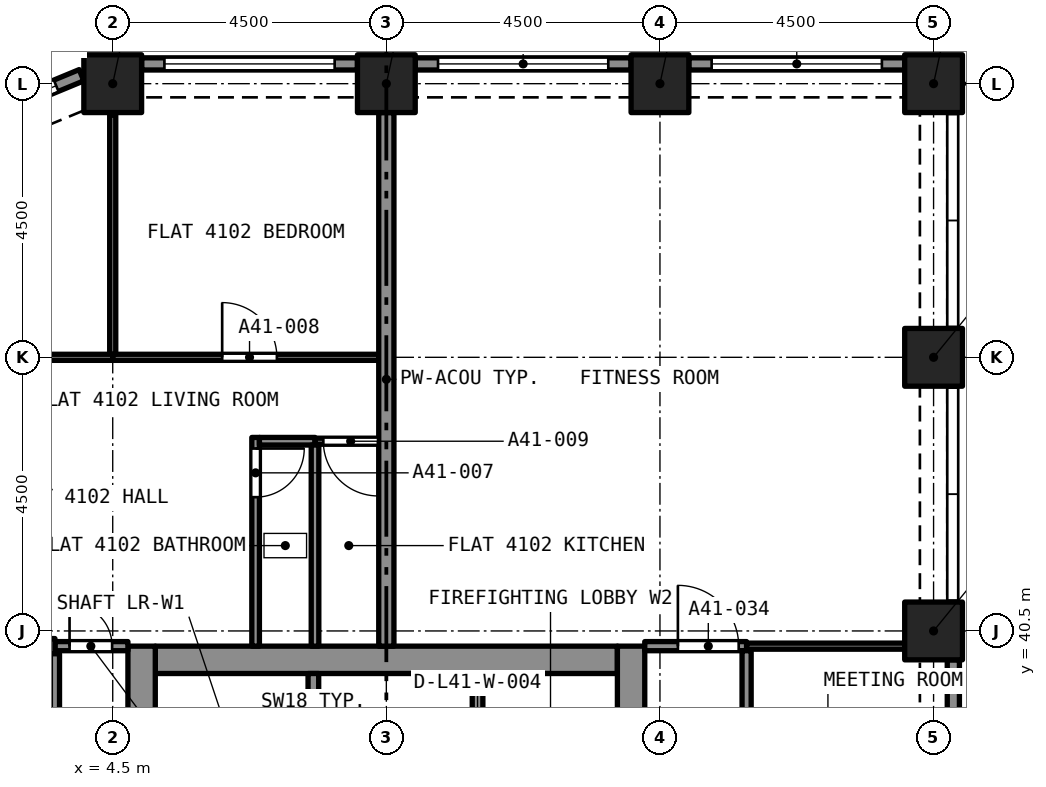
"""IFC4 building model, lengths in metres.
Left out: names, types, materials, properties, quantities, classifications, styles, units other than length and angle.
Written with IfcOpenShell. Run it as: python <this file> out.ifc"""

import sys

from ifc_helpers import new_model, si_unit, direction, frame, frame_2d, origin, origin_2d, place, context, subcontext, project, spatial, rectangle, extrude, element, fill, save


model = new_model("IFC4")
c1 = context("Model", 3, precision=1e-05, world=origin(), true_north=direction((0.0, 1.0)))
c2 = subcontext(c1, "Body", "Model", "MODEL_VIEW")
j1 = project(units=[si_unit("LENGTHUNIT", "METRE"), si_unit("PLANEANGLEUNIT", "RADIAN")], contexts=[c1])
p1 = place(None, origin())
s1 = spatial("IfcSite", under=j1, at=p1, CompositionType="ELEMENT")
p2 = place(p1, origin())
s2 = spatial("IfcBuilding", under=s1, at=p2, CompositionType="ELEMENT")
p3 = place(p2, frame((0.0, 0.0, 146.2)))
s3 = spatial("IfcBuildingStorey", under=s2, at=p3, CompositionType="ELEMENT", Elevation=146.2)
for number, where, z_axis, x_axis in (
    (1, (18.0, 40.5, 0.0), (0.0, 0.0, 1.0), (1.0, 0.0, 0.0)),
    (2, (18.0, 45.0, 0.0), (0.0, 0.0, 1.0), (1.0, 0.0, 0.0)),
    (3, (4.5, 49.5, 0.0), (0.0, 0.0, 1.0), (1.0, 0.0, 0.0)),
    (4, (9.0, 49.5, 0.0), (0.0, 0.0, 1.0), (1.0, 0.0, 0.0)),
    (5, (13.5, 49.5, 0.0), (0.0, 0.0, 1.0), (1.0, 0.0, 0.0)),
    (6, (18.0, 49.5, 0.0), (0.0, 0.0, 1.0), (1.0, 0.0, 0.0)),
):
    element("IfcColumn", number, at=place(p3, frame(where, z_axis=z_axis, x_axis=x_axis)), inside=s3, PredefinedType="COLUMN", context=c2, shape_type="SweptSolid", body=[
        extrude(rectangle(XDim=0.95, YDim=0.95, at=origin_2d()), origin(), (0.0, 0.0, 1.0), 4.4),
    ])
p4 = place(p3, frame((5.2, 40.025, 0.0), z_axis=(0.0, 0.0, 1.0), x_axis=(1.0, 0.0, 0.0)))
e7 = element("IfcWall", 7, at=p4, inside=s3, PredefinedType="SOLIDWALL", context=c2, shape_type="SweptSolid", body=[
    extrude(rectangle(XDim=7.6, YDim=0.45, at=frame_2d((3.8, 0.0))), origin(), (0.0, 0.0, 1.0), 4.4),
])
p5 = place(p3, frame((4.975, 27.25, 0.0), z_axis=(0.0, 0.0, 1.0), x_axis=(0.0, 1.0, 0.0)))
e8 = element("IfcWall", 8, at=p5, inside=s3, PredefinedType="SOLIDWALL", context=c2, shape_type="SweptSolid", body=[
    extrude(rectangle(XDim=13.0, YDim=0.45, at=frame_2d((6.5, 0.0))), origin(), (0.0, 0.0, 1.0), 4.4),
])
p6 = place(p5, frame((8.7, 0.0, 0.0)))
e9 = element("IfcOpeningElement", 9, at=p6, cuts=e8, PredefinedType="OPENING", context=c2, shape_type="SweptSolid", body=[
    extrude(rectangle(XDim=1.2, YDim=2.1, at=frame_2d((0.6, 1.05))), frame((0.0, 0.235, 0.0), z_axis=(0.0, -1.0, 0.0), x_axis=(1.0, 0.0, 0.0)), (0.0, 0.0, 1.0), 0.47),
])
p7 = place(p3, frame((13.025, 27.25, 0.0), z_axis=(0.0, 0.0, 1.0), x_axis=(0.0, 1.0, 0.0)))
e10 = element("IfcWall", 10, at=p7, inside=s3, PredefinedType="SOLIDWALL", context=c2, shape_type="SweptSolid", body=[
    extrude(rectangle(XDim=13.0, YDim=0.45, at=frame_2d((6.5, 0.0))), origin(), (0.0, 0.0, 1.0), 4.4),
])
p8 = place(p7, frame((10.85, 0.0, 0.0)))
e11 = element("IfcOpeningElement", 11, at=p8, cuts=e10, PredefinedType="OPENING", context=c2, shape_type="SweptSolid", body=[
    extrude(rectangle(XDim=1.1, YDim=2.1, at=frame_2d((0.55, 1.05))), frame((0.0, 0.235, 0.0), z_axis=(0.0, -1.0, 0.0), x_axis=(1.0, 0.0, 0.0)), (0.0, 0.0, 1.0), 0.47),
])
p9 = place(p7, frame((8.7, 0.0, 0.0)))
e12 = element("IfcOpeningElement", 12, at=p9, cuts=e10, PredefinedType="OPENING", context=c2, shape_type="SweptSolid", body=[
    extrude(rectangle(XDim=1.2, YDim=2.1, at=frame_2d((0.6, 1.05))), frame((0.0, 0.235, 0.0), z_axis=(0.0, -1.0, 0.0), x_axis=(1.0, 0.0, 0.0)), (0.0, 0.0, 1.0), 0.47),
])
p10 = place(p3, frame((13.975, 49.825, 0.0), z_axis=(0.0, 0.0, 1.0), x_axis=(1.0, 0.0, 0.0)))
e13 = element("IfcWall", 13, at=p10, inside=s3, PredefinedType="SOLIDWALL", context=c2, shape_type="SweptSolid", body=[
    extrude(rectangle(XDim=3.55, YDim=0.2, at=frame_2d((1.775, 0.0))), origin(), (0.0, 0.0, 1.0), 4.4),
])
p11 = place(p10, frame((0.375, 0.0, 0.45)))
e14 = element("IfcOpeningElement", 14, at=p11, cuts=e13, PredefinedType="OPENING", context=c2, shape_type="SweptSolid", body=[
    extrude(rectangle(XDim=2.8, YDim=2.55, at=frame_2d((1.4, 1.275))), frame((0.0, 0.11, 0.0), z_axis=(0.0, -1.0, 0.0), x_axis=(1.0, 0.0, 0.0)), (0.0, 0.0, 1.0), 0.22),
])
p12 = place(p3, frame((9.475, 49.825, 0.0), z_axis=(0.0, 0.0, 1.0), x_axis=(1.0, 0.0, 0.0)))
e15 = element("IfcWall", 15, at=p12, inside=s3, PredefinedType="SOLIDWALL", context=c2, shape_type="SweptSolid", body=[
    extrude(rectangle(XDim=3.55, YDim=0.2, at=frame_2d((1.775, 0.0))), origin(), (0.0, 0.0, 1.0), 4.4),
])
p13 = place(p12, frame((0.375, 0.0, 0.45)))
e16 = element("IfcOpeningElement", 16, at=p13, cuts=e15, PredefinedType="OPENING", context=c2, shape_type="SweptSolid", body=[
    extrude(rectangle(XDim=2.8, YDim=2.55, at=frame_2d((1.4, 1.275))), frame((0.0, 0.11, 0.0), z_axis=(0.0, -1.0, 0.0), x_axis=(1.0, 0.0, 0.0)), (0.0, 0.0, 1.0), 0.22),
])
p14 = place(p3, frame((4.975, 49.825, 0.0), z_axis=(0.0, 0.0, 1.0), x_axis=(1.0, 0.0, 0.0)))
e17 = element("IfcWall", 17, at=p14, inside=s3, PredefinedType="SOLIDWALL", context=c2, shape_type="SweptSolid", body=[
    extrude(rectangle(XDim=3.55, YDim=0.2, at=frame_2d((1.775, 0.0))), origin(), (0.0, 0.0, 1.0), 4.4),
])
p15 = place(p14, frame((0.375, 0.0, 0.45)))
e18 = element("IfcOpeningElement", 18, at=p15, cuts=e17, PredefinedType="OPENING", context=c2, shape_type="SweptSolid", body=[
    extrude(rectangle(XDim=2.8, YDim=2.55, at=frame_2d((1.4, 1.275))), frame((0.0, 0.11, 0.0), z_axis=(0.0, -1.0, 0.0), x_axis=(1.0, 0.0, 0.0)), (0.0, 0.0, 1.0), 0.22),
])
p16 = place(p3, frame((1.767, 48.72, 0.0), z_axis=(0.0, 0.0, 1.0), x_axis=(0.923880599843, 0.382680855588, 0.0)))
e19 = element("IfcWall", 19, at=p16, inside=s3, PredefinedType="SOLIDWALL", context=c2, shape_type="SweptSolid", body=[
    extrude(rectangle(XDim=2.403, YDim=0.2, at=frame_2d((1.201, 0.0))), origin(), (0.0, 0.0, 1.0), 4.4),
])
p17 = place(p16, frame((0.251, 0.0, 0.45)))
e20 = element("IfcOpeningElement", 20, at=p17, cuts=e19, PredefinedType="OPENING", context=c2, shape_type="SweptSolid", body=[
    extrude(rectangle(XDim=1.7, YDim=2.55, at=frame_2d((0.85, 1.275))), frame((0.0, 0.11, 0.0), z_axis=(0.0, -1.0, 0.0), x_axis=(1.0, 0.0, 0.0)), (0.0, 0.0, 1.0), 0.22),
])
p18 = place(p3, frame((18.325, 40.025, 0.0), z_axis=(0.0, 0.0, 1.0), x_axis=(0.0, -1.0, 0.0)))
e21 = element("IfcWall", 21, at=p18, inside=s3, PredefinedType="SOLIDWALL", context=c2, shape_type="SweptSolid", body=[
    extrude(rectangle(XDim=3.55, YDim=0.2, at=frame_2d((1.775, 0.0))), origin(), (0.0, 0.0, 1.0), 4.4),
])
p19 = place(p18, frame((0.875, 0.0, 0.0)))
e22 = element("IfcOpeningElement", 22, at=p19, cuts=e21, PredefinedType="OPENING", context=c2, shape_type="SweptSolid", body=[
    extrude(rectangle(XDim=1.8, YDim=2.4, at=frame_2d((0.9, 1.2))), frame((0.0, 0.11, 0.0), z_axis=(0.0, -1.0, 0.0), x_axis=(1.0, 0.0, 0.0)), (0.0, 0.0, 1.0), 0.22),
])
p20 = place(p3, frame((6.85, 43.683, 0.0), z_axis=(0.0, 0.0, 1.0), x_axis=(0.0, -1.0, 0.0)))
e23 = element("IfcWall", 23, at=p20, inside=s3, PredefinedType="PARTITIONING", context=c2, shape_type="SweptSolid", body=[
    extrude(rectangle(XDim=3.433, YDim=0.125, at=frame_2d((1.716, 0.0))), origin(), (0.0, 0.0, 1.0), 4.1),
])
p21 = place(p20, frame((0.183, 0.0, 0.0)))
e24 = element("IfcOpeningElement", 24, at=p21, cuts=e23, PredefinedType="OPENING", context=c2, shape_type="SweptSolid", body=[
    extrude(rectangle(XDim=0.8, YDim=2.1, at=frame_2d((0.4, 1.05))), frame((0.0, 0.073, 0.0), z_axis=(0.0, -1.0, 0.0), x_axis=(1.0, 0.0, 0.0)), (0.0, 0.0, 1.0), 0.145),
])
p22 = place(p3, frame((6.913, 43.62, 0.0), z_axis=(0.0, 0.0, 1.0), x_axis=(1.0, 0.0, 0.0)))
e25 = element("IfcWall", 25, at=p22, inside=s3, PredefinedType="PARTITIONING", context=c2, shape_type="SweptSolid", body=[
    extrude(rectangle(XDim=0.915, YDim=0.125, at=frame_2d((0.458, 0.0))), origin(), (0.0, 0.0, 1.0), 4.1),
])
p23 = place(p3, frame((7.827, 40.25, 0.0), z_axis=(0.0, 0.0, 1.0), x_axis=(0.0, 1.0, 0.0)))
e26 = element("IfcWall", 26, at=p23, inside=s3, PredefinedType="PARTITIONING", context=c2, shape_type="SweptSolid", body=[
    extrude(rectangle(XDim=3.308, YDim=0.125, at=frame_2d((1.654, 0.0))), origin(), (0.0, 0.0, 1.0), 4.1),
])
p24 = place(p3, frame((4.5, 45.0, 0.0), z_axis=(0.0, 0.0, 1.0), x_axis=(1.0, 0.0, 0.0)))
e27 = element("IfcWall", 27, at=p24, inside=s3, PredefinedType="PARTITIONING", context=c2, shape_type="SweptSolid", body=[
    extrude(rectangle(XDim=4.375, YDim=0.1, at=frame_2d((2.188, 0.0))), origin(), (0.0, 0.0, 1.0), 4.1),
])
p25 = place(p24, frame((1.8, 0.0, 0.0)))
e28 = element("IfcOpeningElement", 28, at=p25, cuts=e27, PredefinedType="OPENING", context=c2, shape_type="SweptSolid", body=[
    extrude(rectangle(XDim=0.9, YDim=2.1, at=frame_2d((0.45, 1.05))), frame((0.0, 0.06, 0.0), z_axis=(0.0, -1.0, 0.0), x_axis=(1.0, 0.0, 0.0)), (0.0, 0.0, 1.0), 0.12),
])
p26 = place(p3, frame((4.5, 45.05, 0.0), z_axis=(0.0, 0.0, 1.0), x_axis=(0.0, 1.0, 0.0)))
e29 = element("IfcWall", 29, at=p26, inside=s3, PredefinedType="PARTITIONING", context=c2, shape_type="SweptSolid", body=[
    extrude(rectangle(XDim=3.936, YDim=0.1, at=frame_2d((1.968, 0.0))), origin(), (0.0, 0.0, 1.0), 4.1),
])
p27 = place(p3, frame((8.875, 43.62, 0.0), z_axis=(0.0, 0.0, 1.0), x_axis=(-1.0, 0.0, 0.0)))
e30 = element("IfcWall", 30, at=p27, inside=s3, PredefinedType="PARTITIONING", context=c2, shape_type="SweptSolid", body=[
    extrude(rectangle(XDim=1.048, YDim=0.1, at=frame_2d((0.524, 0.0))), origin(), (0.0, 0.0, 1.0), 4.1),
])
p28 = place(p27, frame((0.011, 0.0, 0.0)))
e31 = element("IfcOpeningElement", 31, at=p28, cuts=e30, PredefinedType="OPENING", context=c2, shape_type="SweptSolid", body=[
    extrude(rectangle(XDim=0.9, YDim=2.1, at=frame_2d((0.45, 1.05))), frame((0.0, 0.06, 0.0), z_axis=(0.0, -1.0, 0.0), x_axis=(1.0, 0.0, 0.0)), (0.0, 0.0, 1.0), 0.12),
])
p29 = place(p3, frame((0.514, 45.0, 0.0), z_axis=(0.0, 0.0, 1.0), x_axis=(1.0, 0.0, 0.0)))
e32 = element("IfcWall", 32, at=p29, inside=s3, PredefinedType="PARTITIONING", context=c2, shape_type="SweptSolid", body=[
    extrude(rectangle(XDim=3.986, YDim=0.1, at=frame_2d((1.993, 0.0))), origin(), (0.0, 0.0, 1.0), 4.1),
])
p30 = place(p29, frame((1.473, 0.0, 0.0)))
e33 = element("IfcOpeningElement", 33, at=p30, cuts=e32, PredefinedType="OPENING", context=c2, shape_type="SweptSolid", body=[
    extrude(rectangle(XDim=1.0, YDim=2.1, at=frame_2d((0.5, 1.05))), frame((0.0, 0.06, 0.0), z_axis=(0.0, -1.0, 0.0), x_axis=(1.0, 0.0, 0.0)), (0.0, 0.0, 1.0), 0.12),
])
p31 = place(p3, frame((3.55, 40.25, 0.0), z_axis=(0.0, 0.0, 1.0), x_axis=(1.0, 0.0, 0.0)))
e34 = element("IfcWall", 34, at=p31, inside=s3, PredefinedType="PARTITIONING", context=c2, shape_type="SweptSolid", body=[
    extrude(rectangle(XDim=1.2, YDim=0.15, at=frame_2d((0.6, 0.0))), origin(), (0.0, 0.0, 1.0), 4.1),
])
p32 = place(p31, frame((0.24, 0.0, 0.0)))
e35 = element("IfcOpeningElement", 35, at=p32, cuts=e34, PredefinedType="OPENING", context=c2, shape_type="SweptSolid", body=[
    extrude(rectangle(XDim=0.7, YDim=2.1, at=frame_2d((0.35, 1.05))), frame((0.0, 0.085, 0.0), z_axis=(0.0, -1.0, 0.0), x_axis=(1.0, 0.0, 0.0)), (0.0, 0.0, 1.0), 0.17),
])
p33 = place(p3, frame((0.475, 40.25, 0.0), z_axis=(0.0, 0.0, 1.0), x_axis=(1.0, 0.0, 0.0)))
e36 = element("IfcWall", 36, at=p33, inside=s3, PredefinedType="PARTITIONING", context=c2, shape_type="SweptSolid", body=[
    extrude(rectangle(XDim=3.075, YDim=0.25, at=frame_2d((1.538, 0.0))), origin(), (0.0, 0.0, 1.0), 4.1),
])
p34 = place(p3, frame((9.0, 40.25, 0.0), z_axis=(0.0, 0.0, 1.0), x_axis=(0.0, 1.0, 0.0)))
e37 = element("IfcWall", 37, at=p34, inside=s3, PredefinedType="PARTITIONING", context=c2, shape_type="SweptSolid", body=[
    extrude(rectangle(XDim=8.775, YDim=0.25, at=frame_2d((4.387, 0.0))), origin(), (0.0, 0.0, 1.0), 4.1),
])
p35 = place(p3, frame((13.25, 40.25, 0.0), z_axis=(0.0, 0.0, 1.0), x_axis=(1.0, 0.0, 0.0)))
e38 = element("IfcWall", 38, at=p35, inside=s3, PredefinedType="PARTITIONING", context=c2, shape_type="SweptSolid", body=[
    extrude(rectangle(XDim=1.675, YDim=0.15, at=frame_2d((0.837, 0.0))), origin(), (0.0, 0.0, 1.0), 4.1),
])
p36 = place(p35, frame((0.545, 0.0, 0.0)))
e39 = element("IfcOpeningElement", 39, at=p36, cuts=e38, PredefinedType="OPENING", context=c2, shape_type="SweptSolid", body=[
    extrude(rectangle(XDim=1.0, YDim=2.1, at=frame_2d((0.5, 1.05))), frame((0.0, 0.085, 0.0), z_axis=(0.0, -1.0, 0.0), x_axis=(1.0, 0.0, 0.0)), (0.0, 0.0, 1.0), 0.17),
])
p37 = place(p3, frame((14.925, 40.25, 0.0), z_axis=(0.0, 0.0, 1.0), x_axis=(1.0, 0.0, 0.0)))
e40 = element("IfcWall", 40, at=p37, inside=s3, PredefinedType="PARTITIONING", context=c2, shape_type="SweptSolid", body=[
    extrude(rectangle(XDim=2.6, YDim=0.1, at=frame_2d((1.3, 0.0))), origin(), (0.0, 0.0, 1.0), 4.1),
])
p38 = place(p3, frame((14.925, 40.175, 0.0), z_axis=(0.0, 0.0, 1.0), x_axis=(0.0, -1.0, 0.0)))
e41 = element("IfcWall", 41, at=p38, inside=s3, PredefinedType="PARTITIONING", context=c2, shape_type="SweptSolid", body=[
    extrude(rectangle(XDim=8.675, YDim=0.15, at=frame_2d((4.337, 0.0))), origin(), (0.0, 0.0, 1.0), 4.1),
])
p39 = place(p38, frame((3.8, 0.0, 0.0)))
e42 = element("IfcOpeningElement", 42, at=p39, cuts=e41, PredefinedType="OPENING", context=c2, shape_type="SweptSolid", body=[
    extrude(rectangle(XDim=1.0, YDim=2.1, at=frame_2d((0.5, 1.05))), frame((0.0, 0.085, 0.0), z_axis=(0.0, -1.0, 0.0), x_axis=(1.0, 0.0, 0.0)), (0.0, 0.0, 1.0), 0.17),
])
p40 = place(p3, frame((3.55, 31.5, 0.0), z_axis=(0.0, 0.0, 1.0), x_axis=(0.0, 1.0, 0.0)))
e43 = element("IfcWall", 43, at=p40, inside=s3, PredefinedType="PARTITIONING", context=c2, shape_type="SweptSolid", body=[
    extrude(rectangle(XDim=8.625, YDim=0.15, at=frame_2d((4.312, 0.0))), origin(), (0.0, 0.0, 1.0), 4.1),
])
p41 = place(p40, frame((3.875, 0.0, 0.0)))
e44 = element("IfcOpeningElement", 44, at=p41, cuts=e43, PredefinedType="OPENING", context=c2, shape_type="SweptSolid", body=[
    extrude(rectangle(XDim=1.0, YDim=2.1, at=frame_2d((0.5, 1.05))), frame((0.0, 0.085, 0.0), z_axis=(0.0, -1.0, 0.0), x_axis=(1.0, 0.0, 0.0)), (0.0, 0.0, 1.0), 0.17),
])
p42 = place(p3, frame((7.8, 37.5, 0.0), z_axis=(0.0, 0.0, 1.0), x_axis=(0.0, 1.0, 0.0)))
e45 = element("IfcWall", 45, at=p42, inside=s3, PredefinedType="SOLIDWALL", context=c2, shape_type="SweptSolid", body=[
    extrude(rectangle(XDim=2.3, YDim=0.175, at=frame_2d((1.15, 0.0))), origin(), (0.0, 0.0, 1.0), 4.1),
])
p43 = place(p3, frame((10.5, 37.5, 0.0), z_axis=(0.0, 0.0, 1.0), x_axis=(0.0, 1.0, 0.0)))
e46 = element("IfcWall", 46, at=p43, inside=s3, PredefinedType="SOLIDWALL", context=c2, shape_type="SweptSolid", body=[
    extrude(rectangle(XDim=2.3, YDim=0.175, at=frame_2d((1.15, 0.0))), origin(), (0.0, 0.0, 1.0), 4.1),
])
p44 = place(p43, frame((0.65, 0.0, 0.0)))
e47 = element("IfcOpeningElement", 47, at=p44, cuts=e46, PredefinedType="OPENING", context=c2, shape_type="SweptSolid", body=[
    extrude(rectangle(XDim=1.0, YDim=2.1, at=frame_2d((0.5, 1.05))), frame((0.0, 0.097, 0.0), z_axis=(0.0, -1.0, 0.0), x_axis=(1.0, 0.0, 0.0)), (0.0, 0.0, 1.0), 0.195),
])
p45 = place(p11, origin())
e48 = element("IfcWindow", 48, at=p45, inside=s3, PartitioningType="SINGLE_PANEL", PredefinedType="WINDOW", context=c2, shape_type="SweptSolid", body=[
    extrude(rectangle(XDim=2.8, YDim=2.55, at=frame_2d((1.4, 1.275))), frame((0.0, 0.03, 0.0), z_axis=(0.0, -1.0, 0.0), x_axis=(1.0, 0.0, 0.0)), (0.0, 0.0, 1.0), 0.06),
])
fill(e14, e48)
p46 = place(p13, origin())
e49 = element("IfcWindow", 49, at=p46, inside=s3, PartitioningType="SINGLE_PANEL", PredefinedType="WINDOW", context=c2, shape_type="SweptSolid", body=[
    extrude(rectangle(XDim=2.8, YDim=2.55, at=frame_2d((1.4, 1.275))), frame((0.0, 0.03, 0.0), z_axis=(0.0, -1.0, 0.0), x_axis=(1.0, 0.0, 0.0)), (0.0, 0.0, 1.0), 0.06),
])
fill(e16, e49)
p47 = place(p15, origin())
e50 = element("IfcWindow", 50, at=p47, inside=s3, PartitioningType="SINGLE_PANEL", PredefinedType="WINDOW", context=c2, shape_type="SweptSolid", body=[
    extrude(rectangle(XDim=2.8, YDim=2.55, at=frame_2d((1.4, 1.275))), frame((0.0, 0.03, 0.0), z_axis=(0.0, -1.0, 0.0), x_axis=(1.0, 0.0, 0.0)), (0.0, 0.0, 1.0), 0.06),
])
fill(e18, e50)
p48 = place(p17, origin())
e51 = element("IfcWindow", 51, at=p48, inside=s3, PartitioningType="SINGLE_PANEL", PredefinedType="WINDOW", context=c2, shape_type="SweptSolid", body=[
    extrude(rectangle(XDim=1.7, YDim=2.55, at=frame_2d((0.85, 1.275))), frame((0.0, 0.03, 0.0), z_axis=(0.0, -1.0, 0.0), x_axis=(1.0, 0.0, 0.0)), (0.0, 0.0, 1.0), 0.06),
])
fill(e20, e51)
p49 = place(p21, origin())
e52 = element("IfcDoor", 52, at=p49, inside=s3, OperationType="SINGLE_SWING_LEFT", PredefinedType="DOOR", context=c2, shape_type="SweptSolid", body=[
    extrude(rectangle(XDim=0.8, YDim=2.1, at=frame_2d((0.4, 1.05))), frame((0.0, 0.025, 0.0), z_axis=(0.0, -1.0, 0.0), x_axis=(1.0, 0.0, 0.0)), (0.0, 0.0, 1.0), 0.05),
])
fill(e24, e52)
p50 = place(p25, origin())
e53 = element("IfcDoor", 53, at=p50, inside=s3, OperationType="SINGLE_SWING_RIGHT", PredefinedType="DOOR", context=c2, shape_type="SweptSolid", body=[
    extrude(rectangle(XDim=0.9, YDim=2.1, at=frame_2d((0.45, 1.05))), frame((0.0, 0.025, 0.0), z_axis=(0.0, -1.0, 0.0), x_axis=(1.0, 0.0, 0.0)), (0.0, 0.0, 1.0), 0.05),
])
fill(e28, e53)
p51 = place(p28, origin())
e54 = element("IfcDoor", 54, at=p51, inside=s3, OperationType="SINGLE_SWING_LEFT", PredefinedType="DOOR", context=c2, shape_type="SweptSolid", body=[
    extrude(rectangle(XDim=0.9, YDim=2.1, at=frame_2d((0.45, 1.05))), frame((0.0, 0.025, 0.0), z_axis=(0.0, -1.0, 0.0), x_axis=(1.0, 0.0, 0.0)), (0.0, 0.0, 1.0), 0.05),
])
fill(e31, e54)
p52 = place(p32, origin())
e55 = element("IfcDoor", 55, at=p52, inside=s3, OperationType="SINGLE_SWING_LEFT", PredefinedType="DOOR", context=c2, shape_type="SweptSolid", body=[
    extrude(rectangle(XDim=0.7, YDim=2.1, at=frame_2d((0.35, 1.05))), frame((0.0, 0.025, 0.0), z_axis=(0.0, -1.0, 0.0), x_axis=(1.0, 0.0, 0.0)), (0.0, 0.0, 1.0), 0.05),
])
fill(e35, e55)
p53 = place(p36, origin())
e56 = element("IfcDoor", 56, at=p53, inside=s3, OperationType="SINGLE_SWING_RIGHT", PredefinedType="DOOR", context=c2, shape_type="SweptSolid", body=[
    extrude(rectangle(XDim=1.0, YDim=2.1, at=frame_2d((0.5, 1.05))), frame((0.0, 0.025, 0.0), z_axis=(0.0, -1.0, 0.0), x_axis=(1.0, 0.0, 0.0)), (0.0, 0.0, 1.0), 0.05),
])
fill(e39, e56)
save(model, sys.argv[1])
